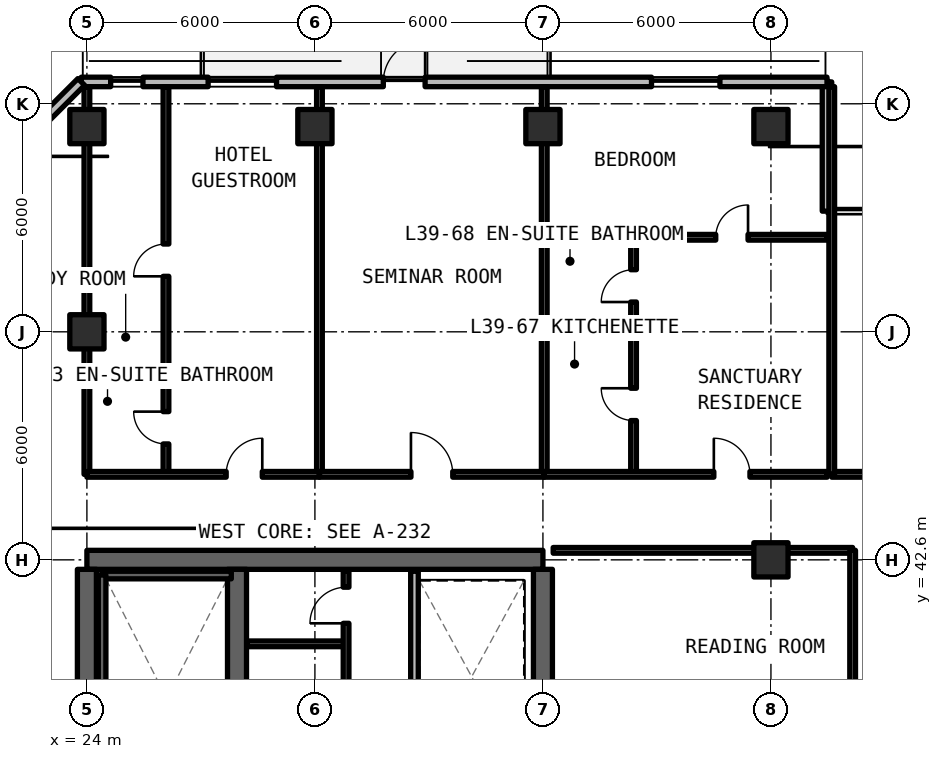
"""IFC4 building model, lengths in metres.
Left out: names, types, materials, properties, quantities, classifications, styles, units other than length and angle.
Written with IfcOpenShell. Run it as: python <this file> out.ifc"""

import sys

from ifc_helpers import new_model, si_unit, direction, frame, frame_2d, origin, origin_2d, place, context, subcontext, project, spatial, rectangle, extrude, element, fill, save


model = new_model("IFC4")
c1 = context("Model", 3, precision=1e-05, world=origin(), true_north=direction((0.0, 1.0)))
c2 = subcontext(c1, "Body", "Model", "MODEL_VIEW")
j1 = project(units=[si_unit("LENGTHUNIT", "METRE"), si_unit("PLANEANGLEUNIT", "RADIAN")], contexts=[c1])
p1 = place(None, origin())
s1 = spatial("IfcSite", under=j1, at=p1, CompositionType="ELEMENT")
p2 = place(p1, origin())
s2 = spatial("IfcBuilding", under=s1, at=p2, CompositionType="ELEMENT")
p3 = place(p2, frame((0.0, 0.0, 141.9)))
s3 = spatial("IfcBuildingStorey", under=s2, at=p3, CompositionType="ELEMENT", Elevation=141.9)
p4 = place(p3, frame((36.0, 42.6, 0.0), z_axis=(0.0, 0.0, 1.0), x_axis=(-1.0, 0.0, 0.0)))
e1 = element("IfcWall", 1, at=p4, inside=s3, PredefinedType="SHEAR", context=c2, shape_type="SweptSolid", body=[
    extrude(rectangle(XDim=12.0, YDim=0.5, at=frame_2d((6.0, 0.0))), origin(), (0.0, 0.0, 1.0), 3.3),
])
p5 = place(p3, frame((24.0, 24.85, 0.0), z_axis=(0.0, 0.0, 1.0), x_axis=(0.0, 1.0, 0.0)))
e2 = element("IfcWall", 2, at=p5, inside=s3, PredefinedType="SHEAR", context=c2, shape_type="SweptSolid", body=[
    extrude(rectangle(XDim=17.5, YDim=0.5, at=frame_2d((8.75, 0.0))), origin(), (0.0, 0.0, 1.0), 3.3),
])
p6 = place(p3, frame((36.0, 36.8, 0.0), z_axis=(0.0, 0.0, 1.0), x_axis=(0.0, 1.0, 0.0)))
e3 = element("IfcWall", 3, at=p6, inside=s3, PredefinedType="SHEAR", context=c2, shape_type="SweptSolid", body=[
    extrude(rectangle(XDim=5.55, YDim=0.5, at=frame_2d((2.775, 0.0))), origin(), (0.0, 0.0, 1.0), 3.3),
])
p7 = place(p3, frame((27.95, 24.85, 0.0), z_axis=(0.0, 0.0, 1.0), x_axis=(0.0, 1.0, 0.0)))
e4 = element("IfcWall", 4, at=p7, inside=s3, PredefinedType="SHEAR", context=c2, shape_type="SweptSolid", body=[
    extrude(rectangle(XDim=17.5, YDim=0.5, at=frame_2d((8.75, 0.0))), origin(), (0.0, 0.0, 1.0), 3.3),
])
p8 = place(p7, frame((0.4, 0.0, 0.0)))
e5 = element("IfcOpeningElement", 5, at=p8, cuts=e4, PredefinedType="OPENING", context=c2, shape_type="SweptSolid", body=[
    extrude(rectangle(XDim=1.15, YDim=2.15, at=frame_2d((0.575, 1.075))), frame((0.0, 0.26, 0.0), z_axis=(0.0, -1.0, 0.0), x_axis=(1.0, 0.0, 0.0)), (0.0, 0.0, 1.0), 0.52),
])
p9 = place(p7, frame((9.6, 0.0, 0.0)))
e6 = element("IfcOpeningElement", 6, at=p9, cuts=e4, PredefinedType="OPENING", context=c2, shape_type="SweptSolid", body=[
    extrude(rectangle(XDim=1.15, YDim=2.15, at=frame_2d((0.575, 1.075))), frame((0.0, 0.26, 0.0), z_axis=(0.0, -1.0, 0.0), x_axis=(1.0, 0.0, 0.0)), (0.0, 0.0, 1.0), 0.52),
])
for number, where, z_axis, x_axis in (
    (7, (42.0, 42.6, 0.0), (0.0, 0.0, 1.0), (1.0, 0.0, 0.0)),
    (8, (24.0, 48.6, 0.0), (0.0, 0.0, 1.0), (1.0, 0.0, 0.0)),
    (9, (24.0, 54.0, 0.0), (0.0, 0.0, 1.0), (1.0, 0.0, 0.0)),
    (10, (30.0, 54.0, 0.0), (0.0, 0.0, 1.0), (1.0, 0.0, 0.0)),
    (11, (36.0, 54.0, 0.0), (0.0, 0.0, 1.0), (1.0, 0.0, 0.0)),
    (12, (42.0, 54.0, 0.0), (0.0, 0.0, 1.0), (1.0, 0.0, 0.0)),
):
    element("IfcColumn", number, at=place(p3, frame(where, z_axis=z_axis, x_axis=x_axis)), inside=s3, PredefinedType="COLUMN", context=c2, shape_type="SweptSolid", body=[
        extrude(rectangle(XDim=0.9, YDim=0.9, at=origin_2d()), origin(), (0.0, 0.0, 1.0), 3.3),
    ])
p10 = place(p3, frame((43.475, 51.775, 0.0), z_axis=(0.0, 0.0, 1.0), x_axis=(0.0, 1.0, 0.0)))
e13 = element("IfcWall", 13, at=p10, inside=s3, PredefinedType="SOLIDWALL", context=c2, shape_type="SweptSolid", body=[
    extrude(rectangle(XDim=3.4, YDim=0.25, at=frame_2d((1.7, 0.0))), origin(), (0.0, 0.0, 1.0), 3.08),
])
p11 = place(p3, frame((43.475, 55.175, 0.0), z_axis=(0.0, 0.0, 1.0), x_axis=(-1.0, 0.0, 0.0)))
e14 = element("IfcWall", 14, at=p11, inside=s3, PredefinedType="SOLIDWALL", context=c2, shape_type="SweptSolid", body=[
    extrude(rectangle(XDim=19.623, YDim=0.25, at=frame_2d((9.812, 0.0))), origin(), (0.0, 0.0, 1.0), 3.08),
])
p12 = place(p11, frame((10.575, 0.0, 0.0)))
e15 = element("IfcOpeningElement", 15, at=p12, cuts=e14, PredefinedType="OPENING", context=c2, shape_type="SweptSolid", body=[
    extrude(rectangle(XDim=1.1, YDim=2.15, at=frame_2d((0.55, 1.075))), frame((0.0, 0.135, 0.0), z_axis=(0.0, -1.0, 0.0), x_axis=(1.0, 0.0, 0.0)), (0.0, 0.0, 1.0), 0.27),
])
p13 = place(p11, frame((18.0, 0.0, 0.78)))
e16 = element("IfcOpeningElement", 16, at=p13, cuts=e14, PredefinedType="OPENING", context=c2, shape_type="SweptSolid", body=[
    extrude(rectangle(XDim=0.85, YDim=1.65, at=frame_2d((0.425, 0.825))), frame((0.0, 0.135, 0.0), z_axis=(0.0, -1.0, 0.0), x_axis=(1.0, 0.0, 0.0)), (0.0, 0.0, 1.0), 0.27),
])
p14 = place(p11, frame((14.485, 0.0, 0.78)))
e17 = element("IfcOpeningElement", 17, at=p14, cuts=e14, PredefinedType="OPENING", context=c2, shape_type="SweptSolid", body=[
    extrude(rectangle(XDim=1.8, YDim=1.66, at=frame_2d((0.9, 0.83))), frame((0.0, 0.135, 0.0), z_axis=(0.0, -1.0, 0.0), x_axis=(1.0, 0.0, 0.0)), (0.0, 0.0, 1.0), 0.27),
])
p15 = place(p11, frame((2.818, 0.0, 0.78)))
e18 = element("IfcOpeningElement", 18, at=p15, cuts=e14, PredefinedType="OPENING", context=c2, shape_type="SweptSolid", body=[
    extrude(rectangle(XDim=1.8, YDim=1.66, at=frame_2d((0.9, 0.83))), frame((0.0, 0.135, 0.0), z_axis=(0.0, -1.0, 0.0), x_axis=(1.0, 0.0, 0.0)), (0.0, 0.0, 1.0), 0.27),
])
p16 = place(p3, frame((23.852, 55.175, 0.0), z_axis=(0.0, 0.0, 1.0), x_axis=(-0.70708586489, -0.707127696864, 0.0)))
e19 = element("IfcWall", 19, at=p16, inside=s3, PredefinedType="SOLIDWALL", context=c2, shape_type="SweptSolid", body=[
    extrude(rectangle(XDim=5.836, YDim=0.25, at=frame_2d((2.918, 0.0))), origin(), (0.0, 0.0, 1.0), 3.08),
])
p17 = place(p16, frame((1.538, 0.0, 0.78)))
e20 = element("IfcOpeningElement", 20, at=p17, cuts=e19, PredefinedType="OPENING", context=c2, shape_type="SweptSolid", body=[
    extrude(rectangle(XDim=3.4, YDim=1.66, at=frame_2d((1.7, 0.83))), frame((0.0, 0.135, 0.0), z_axis=(0.0, -1.0, 0.0), x_axis=(1.0, 0.0, 0.0)), (0.0, 0.0, 1.0), 0.27),
])
p18 = place(p3, frame((28.22, 40.39, 0.0), z_axis=(0.0, 0.0, 1.0), x_axis=(1.0, 0.0, 0.0)))
e21 = element("IfcWall", 21, at=p18, inside=s3, PredefinedType="SOLIDWALL", context=c2, shape_type="SweptSolid", body=[
    extrude(rectangle(XDim=2.58, YDim=0.15, at=frame_2d((1.29, 0.0))), origin(), (0.0, 0.0, 1.0), 2.35),
])
p19 = place(p3, frame((30.82, 36.88, 0.0), z_axis=(0.0, 0.0, 1.0), x_axis=(0.0, 1.0, 0.0)))
e22 = element("IfcWall", 22, at=p19, inside=s3, PredefinedType="SOLIDWALL", context=c2, shape_type="SweptSolid", body=[
    extrude(rectangle(XDim=5.42, YDim=0.15, at=frame_2d((2.71, 0.0))), origin(), (0.0, 0.0, 1.0), 2.35),
])
p20 = place(p19, frame((1.15, 0.0, 0.0)))
e23 = element("IfcOpeningElement", 23, at=p20, cuts=e22, PredefinedType="OPENING", context=c2, shape_type="SweptSolid", body=[
    extrude(rectangle(XDim=0.95, YDim=2.15, at=frame_2d((0.475, 1.075))), frame((0.0, 0.085, 0.0), z_axis=(0.0, -1.0, 0.0), x_axis=(1.0, 0.0, 0.0)), (0.0, 0.0, 1.0), 0.17),
])
p21 = place(p19, frame((4.05, 0.0, 0.0)))
e24 = element("IfcOpeningElement", 24, at=p21, cuts=e22, PredefinedType="OPENING", context=c2, shape_type="SweptSolid", body=[
    extrude(rectangle(XDim=0.95, YDim=2.15, at=frame_2d((0.475, 1.075))), frame((0.0, 0.085, 0.0), z_axis=(0.0, -1.0, 0.0), x_axis=(1.0, 0.0, 0.0)), (0.0, 0.0, 1.0), 0.17),
])
p22 = place(p3, frame((32.62, 36.88, 0.0), z_axis=(0.0, 0.0, 1.0), x_axis=(0.0, 1.0, 0.0)))
e25 = element("IfcWall", 25, at=p22, inside=s3, PredefinedType="SOLIDWALL", context=c2, shape_type="SweptSolid", body=[
    extrude(rectangle(XDim=5.42, YDim=0.2, at=frame_2d((2.71, 0.0))), origin(), (0.0, 0.0, 1.0), 2.35),
])
p23 = place(p3, frame((36.27, 42.85, 0.0), z_axis=(0.0, 0.0, 1.0), x_axis=(1.0, 0.0, 0.0)))
e26 = element("IfcWall", 26, at=p23, inside=s3, PredefinedType="SOLIDWALL", context=c2, shape_type="SweptSolid", body=[
    extrude(rectangle(XDim=7.88, YDim=0.15, at=frame_2d((3.94, 0.0))), origin(), (0.0, 0.0, 1.0), 2.35),
])
p24 = place(p3, frame((44.15, 36.85, 0.0), z_axis=(0.0, 0.0, 1.0), x_axis=(0.0, 1.0, 0.0)))
e27 = element("IfcWall", 27, at=p24, inside=s3, PredefinedType="SOLIDWALL", context=c2, shape_type="SweptSolid", body=[
    extrude(rectangle(XDim=6.0, YDim=0.15, at=frame_2d((3.0, 0.0))), origin(), (0.0, 0.0, 1.0), 2.35),
])
p25 = place(p3, frame((43.6, 44.85, 0.0), z_axis=(0.0, 0.0, 1.0), x_axis=(1.0, 0.0, 0.0)))
e28 = element("IfcWall", 28, at=p25, inside=s3, PredefinedType="SOLIDWALL", context=c2, shape_type="SweptSolid", body=[
    extrude(rectangle(XDim=8.4, YDim=0.15, at=frame_2d((4.2, 0.0))), origin(), (0.0, 0.0, 1.0), 2.35),
])
p26 = place(p25, frame((3.65, 0.0, 0.0)))
e29 = element("IfcOpeningElement", 29, at=p26, cuts=e28, PredefinedType="OPENING", context=c2, shape_type="SweptSolid", body=[
    extrude(rectangle(XDim=1.1, YDim=2.15, at=frame_2d((0.55, 1.075))), frame((0.0, 0.085, 0.0), z_axis=(0.0, -1.0, 0.0), x_axis=(1.0, 0.0, 0.0)), (0.0, 0.0, 1.0), 0.17),
])
for number, where, z_axis, x_axis in (
    (30, (43.6, 44.85, 0.0), (0.0, 0.0, 1.0), (0.0, 1.0, 0.0)),
    (31, (24.0, 44.85, 0.0), (0.0, 0.0, 1.0), (0.0, 1.0, 0.0)),
    (32, (30.119, 44.85, 0.0), (0.0, 0.0, 1.0), (0.0, 1.0, 0.0)),
):
    element("IfcWall", number, at=place(p3, frame(where, z_axis=z_axis, x_axis=x_axis)), inside=s3, PredefinedType="SOLIDWALL", context=c2, shape_type="SweptSolid", body=[
        extrude(rectangle(XDim=10.2, YDim=0.15, at=frame_2d((5.1, 0.0))), origin(), (0.0, 0.0, 1.0), 2.35),
    ])
p27 = place(p3, frame((24.0, 47.3, 0.0), z_axis=(0.0, 0.0, 1.0), x_axis=(1.0, 0.0, 0.0)))
e33 = element("IfcWall", 33, at=p27, inside=s3, PredefinedType="PARTITIONING", context=c2, shape_type="SweptSolid", body=[
    extrude(rectangle(XDim=2.081, YDim=0.15, at=frame_2d((1.04, 0.0))), origin(), (0.0, 0.0, 1.0), 2.35),
])
p28 = place(p3, frame((26.081, 44.85, 0.0), z_axis=(0.0, 0.0, 1.0), x_axis=(0.0, 1.0, 0.0)))
e34 = element("IfcWall", 34, at=p28, inside=s3, PredefinedType="PARTITIONING", context=c2, shape_type="SweptSolid", body=[
    extrude(rectangle(XDim=10.2, YDim=0.15, at=frame_2d((5.1, 0.0))), origin(), (0.0, 0.0, 1.0), 2.35),
])
p29 = place(p28, frame((0.8, 0.0, 0.0)))
e35 = element("IfcOpeningElement", 35, at=p29, cuts=e34, PredefinedType="OPENING", context=c2, shape_type="SweptSolid", body=[
    extrude(rectangle(XDim=0.85, YDim=2.1, at=frame_2d((0.425, 1.05))), frame((0.0, 0.085, 0.0), z_axis=(0.0, -1.0, 0.0), x_axis=(1.0, 0.0, 0.0)), (0.0, 0.0, 1.0), 0.17),
])
p30 = place(p28, frame((5.21, 0.0, 0.0)))
e36 = element("IfcOpeningElement", 36, at=p30, cuts=e34, PredefinedType="OPENING", context=c2, shape_type="SweptSolid", body=[
    extrude(rectangle(XDim=0.85, YDim=2.1, at=frame_2d((0.425, 1.05))), frame((0.0, 0.085, 0.0), z_axis=(0.0, -1.0, 0.0), x_axis=(1.0, 0.0, 0.0)), (0.0, 0.0, 1.0), 0.17),
])
p31 = place(p3, frame((24.0, 44.85, 0.0), z_axis=(0.0, 0.0, 1.0), x_axis=(1.0, 0.0, 0.0)))
e37 = element("IfcWall", 37, at=p31, inside=s3, PredefinedType="SOLIDWALL", context=c2, shape_type="SweptSolid", body=[
    extrude(rectangle(XDim=6.119, YDim=0.15, at=frame_2d((3.06, 0.0))), origin(), (0.0, 0.0, 1.0), 2.35),
])
p32 = place(p31, frame((3.665, 0.0, 0.0)))
e38 = element("IfcOpeningElement", 38, at=p32, cuts=e37, PredefinedType="OPENING", context=c2, shape_type="SweptSolid", body=[
    extrude(rectangle(XDim=0.95, YDim=2.15, at=frame_2d((0.475, 1.075))), frame((0.0, 0.085, 0.0), z_axis=(0.0, -1.0, 0.0), x_axis=(1.0, 0.0, 0.0)), (0.0, 0.0, 1.0), 0.17),
])
p33 = place(p3, frame((36.035, 44.85, 0.0), z_axis=(0.0, 0.0, 1.0), x_axis=(0.0, 1.0, 0.0)))
e39 = element("IfcWall", 39, at=p33, inside=s3, PredefinedType="SOLIDWALL", context=c2, shape_type="SweptSolid", body=[
    extrude(rectangle(XDim=10.2, YDim=0.15, at=frame_2d((5.1, 0.0))), origin(), (0.0, 0.0, 1.0), 2.35),
])
p34 = place(p3, frame((30.119, 44.85, 0.0), z_axis=(0.0, 0.0, 1.0), x_axis=(1.0, 0.0, 0.0)))
e40 = element("IfcWall", 40, at=p34, inside=s3, PredefinedType="SOLIDWALL", context=c2, shape_type="SweptSolid", body=[
    extrude(rectangle(XDim=5.916, YDim=0.15, at=frame_2d((2.958, 0.0))), origin(), (0.0, 0.0, 1.0), 2.35),
])
p35 = place(p34, frame((2.408, 0.0, 0.0)))
e41 = element("IfcOpeningElement", 41, at=p35, cuts=e40, PredefinedType="OPENING", context=c2, shape_type="SweptSolid", body=[
    extrude(rectangle(XDim=1.1, YDim=2.15, at=frame_2d((0.55, 1.075))), frame((0.0, 0.085, 0.0), z_axis=(0.0, -1.0, 0.0), x_axis=(1.0, 0.0, 0.0)), (0.0, 0.0, 1.0), 0.17),
])
p36 = place(p3, frame((36.035, 48.53, 0.0), z_axis=(0.0, 0.0, 1.0), x_axis=(1.0, 0.0, 0.0)))
e42 = element("IfcWall", 42, at=p36, inside=s3, PredefinedType="PARTITIONING", context=c2, shape_type="SweptSolid", body=[
    extrude(rectangle(XDim=2.35, YDim=0.15, at=frame_2d((1.175, 0.0))), origin(), (0.0, 0.0, 1.0), 2.35),
])
p37 = place(p3, frame((38.385, 44.85, 0.0), z_axis=(0.0, 0.0, 1.0), x_axis=(0.0, 1.0, 0.0)))
e43 = element("IfcWall", 43, at=p37, inside=s3, PredefinedType="PARTITIONING", context=c2, shape_type="SweptSolid", body=[
    extrude(rectangle(XDim=6.238, YDim=0.15, at=frame_2d((3.119, 0.0))), origin(), (0.0, 0.0, 1.0), 2.35),
])
p38 = place(p37, frame((1.415, 0.0, 0.0)))
e44 = element("IfcOpeningElement", 44, at=p38, cuts=e43, PredefinedType="OPENING", context=c2, shape_type="SweptSolid", body=[
    extrude(rectangle(XDim=0.85, YDim=2.1, at=frame_2d((0.425, 1.05))), frame((0.0, 0.085, 0.0), z_axis=(0.0, -1.0, 0.0), x_axis=(1.0, 0.0, 0.0)), (0.0, 0.0, 1.0), 0.17),
])
p39 = place(p37, frame((4.534, 0.0, 0.0)))
e45 = element("IfcOpeningElement", 45, at=p39, cuts=e43, PredefinedType="OPENING", context=c2, shape_type="SweptSolid", body=[
    extrude(rectangle(XDim=0.85, YDim=2.1, at=frame_2d((0.425, 1.05))), frame((0.0, 0.085, 0.0), z_axis=(0.0, -1.0, 0.0), x_axis=(1.0, 0.0, 0.0)), (0.0, 0.0, 1.0), 0.17),
])
p40 = place(p3, frame((36.035, 51.088, 0.0), z_axis=(0.0, 0.0, 1.0), x_axis=(1.0, 0.0, 0.0)))
e46 = element("IfcWall", 46, at=p40, inside=s3, PredefinedType="PARTITIONING", context=c2, shape_type="SweptSolid", body=[
    extrude(rectangle(XDim=7.445, YDim=0.15, at=frame_2d((3.723, 0.0))), origin(), (0.0, 0.0, 1.0), 2.35),
])
p41 = place(p40, frame((4.513, 0.0, 0.0)))
e47 = element("IfcOpeningElement", 47, at=p41, cuts=e46, PredefinedType="OPENING", context=c2, shape_type="SweptSolid", body=[
    extrude(rectangle(XDim=0.85, YDim=2.1, at=frame_2d((0.425, 1.05))), frame((0.0, 0.085, 0.0), z_axis=(0.0, -1.0, 0.0), x_axis=(1.0, 0.0, 0.0)), (0.0, 0.0, 1.0), 0.17),
])
p42 = place(p3, frame((36.035, 44.85, 0.0), z_axis=(0.0, 0.0, 1.0), x_axis=(1.0, 0.0, 0.0)))
e48 = element("IfcWall", 48, at=p42, inside=s3, PredefinedType="SOLIDWALL", context=c2, shape_type="SweptSolid", body=[
    extrude(rectangle(XDim=7.445, YDim=0.15, at=frame_2d((3.723, 0.0))), origin(), (0.0, 0.0, 1.0), 2.35),
])
p43 = place(p42, frame((4.463, 0.0, 0.0)))
e49 = element("IfcOpeningElement", 49, at=p43, cuts=e48, PredefinedType="OPENING", context=c2, shape_type="SweptSolid", body=[
    extrude(rectangle(XDim=0.95, YDim=2.15, at=frame_2d((0.475, 1.075))), frame((0.0, 0.085, 0.0), z_axis=(0.0, -1.0, 0.0), x_axis=(1.0, 0.0, 0.0)), (0.0, 0.0, 1.0), 0.17),
])
p44 = place(p3, frame((27.8, 42.2, 0.0), z_axis=(0.0, 0.0, 1.0), x_axis=(-1.0, 0.0, 0.0)))
e50 = element("IfcWall", 50, at=p44, inside=s3, PredefinedType="SOLIDWALL", context=c2, shape_type="SweptSolid", body=[
    extrude(rectangle(XDim=3.4, YDim=0.2, at=frame_2d((1.7, 0.0))), origin(), (0.0, 0.0, 1.0), 3.3),
])
p45 = place(p3, frame((24.4, 42.2, 0.0), z_axis=(0.0, 0.0, 1.0), x_axis=(0.0, -1.0, 0.0)))
e51 = element("IfcWall", 51, at=p45, inside=s3, PredefinedType="SOLIDWALL", context=c2, shape_type="SweptSolid", body=[
    extrude(rectangle(XDim=8.0, YDim=0.2, at=frame_2d((4.0, 0.0))), origin(), (0.0, 0.0, 1.0), 3.3),
])
p46 = place(p12, frame((1.1, 0.0, 0.0), z_axis=(0.0, 0.0, 1.0), x_axis=(-1.0, 0.0, 0.0)))
e52 = element("IfcDoor", 52, at=p46, inside=s3, OperationType="SINGLE_SWING_LEFT", PredefinedType="DOOR", context=c2, shape_type="SweptSolid", body=[
    extrude(rectangle(XDim=1.1, YDim=2.15, at=frame_2d((0.55, 1.075))), frame((0.0, 0.025, 0.0), z_axis=(0.0, -1.0, 0.0), x_axis=(1.0, 0.0, 0.0)), (0.0, 0.0, 1.0), 0.05),
])
fill(e15, e52)
p47 = place(p13, origin())
e53 = element("IfcWindow", 53, at=p47, inside=s3, PartitioningType="SINGLE_PANEL", PredefinedType="WINDOW", context=c2, shape_type="SweptSolid", body=[
    extrude(rectangle(XDim=0.85, YDim=1.65, at=frame_2d((0.425, 0.825))), frame((0.0, 0.03, 0.0), z_axis=(0.0, -1.0, 0.0), x_axis=(1.0, 0.0, 0.0)), (0.0, 0.0, 1.0), 0.06),
])
fill(e16, e53)
p48 = place(p14, origin())
e54 = element("IfcWindow", 54, at=p48, inside=s3, PartitioningType="SINGLE_PANEL", PredefinedType="WINDOW", context=c2, shape_type="SweptSolid", body=[
    extrude(rectangle(XDim=1.8, YDim=1.66, at=frame_2d((0.9, 0.83))), frame((0.0, 0.03, 0.0), z_axis=(0.0, -1.0, 0.0), x_axis=(1.0, 0.0, 0.0)), (0.0, 0.0, 1.0), 0.06),
])
fill(e17, e54)
p49 = place(p15, origin())
e55 = element("IfcWindow", 55, at=p49, inside=s3, PartitioningType="SINGLE_PANEL", PredefinedType="WINDOW", context=c2, shape_type="SweptSolid", body=[
    extrude(rectangle(XDim=1.8, YDim=1.66, at=frame_2d((0.9, 0.83))), frame((0.0, 0.03, 0.0), z_axis=(0.0, -1.0, 0.0), x_axis=(1.0, 0.0, 0.0)), (0.0, 0.0, 1.0), 0.06),
])
fill(e18, e55)
p50 = place(p21, origin())
e56 = element("IfcDoor", 56, at=p50, inside=s3, OperationType="SINGLE_SWING_LEFT", PredefinedType="DOOR", context=c2, shape_type="SweptSolid", body=[
    extrude(rectangle(XDim=0.95, YDim=2.15, at=frame_2d((0.475, 1.075))), frame((0.0, 0.025, 0.0), z_axis=(0.0, -1.0, 0.0), x_axis=(1.0, 0.0, 0.0)), (0.0, 0.0, 1.0), 0.05),
])
fill(e24, e56)
p51 = place(p29, origin())
e57 = element("IfcDoor", 57, at=p51, inside=s3, OperationType="SINGLE_SWING_RIGHT", PredefinedType="DOOR", context=c2, shape_type="SweptSolid", body=[
    extrude(rectangle(XDim=0.85, YDim=2.1, at=frame_2d((0.425, 1.05))), frame((0.0, 0.025, 0.0), z_axis=(0.0, -1.0, 0.0), x_axis=(1.0, 0.0, 0.0)), (0.0, 0.0, 1.0), 0.05),
])
fill(e35, e57)
p52 = place(p30, origin())
e58 = element("IfcDoor", 58, at=p52, inside=s3, OperationType="SINGLE_SWING_LEFT", PredefinedType="DOOR", context=c2, shape_type="SweptSolid", body=[
    extrude(rectangle(XDim=0.85, YDim=2.1, at=frame_2d((0.425, 1.05))), frame((0.0, 0.025, 0.0), z_axis=(0.0, -1.0, 0.0), x_axis=(1.0, 0.0, 0.0)), (0.0, 0.0, 1.0), 0.05),
])
fill(e36, e58)
p53 = place(p32, origin())
e59 = element("IfcDoor", 59, at=p53, inside=s3, OperationType="SINGLE_SWING_RIGHT", PredefinedType="DOOR", context=c2, shape_type="SweptSolid", body=[
    extrude(rectangle(XDim=0.95, YDim=2.15, at=frame_2d((0.475, 1.075))), frame((0.0, 0.025, 0.0), z_axis=(0.0, -1.0, 0.0), x_axis=(1.0, 0.0, 0.0)), (0.0, 0.0, 1.0), 0.05),
])
fill(e38, e59)
p54 = place(p35, origin())
e60 = element("IfcDoor", 60, at=p54, inside=s3, OperationType="SINGLE_SWING_LEFT", PredefinedType="DOOR", context=c2, shape_type="SweptSolid", body=[
    extrude(rectangle(XDim=1.1, YDim=2.15, at=frame_2d((0.55, 1.075))), frame((0.0, 0.025, 0.0), z_axis=(0.0, -1.0, 0.0), x_axis=(1.0, 0.0, 0.0)), (0.0, 0.0, 1.0), 0.05),
])
fill(e41, e60)
p55 = place(p38, origin())
e61 = element("IfcDoor", 61, at=p55, inside=s3, OperationType="SINGLE_SWING_RIGHT", PredefinedType="DOOR", context=c2, shape_type="SweptSolid", body=[
    extrude(rectangle(XDim=0.85, YDim=2.1, at=frame_2d((0.425, 1.05))), frame((0.0, 0.025, 0.0), z_axis=(0.0, -1.0, 0.0), x_axis=(1.0, 0.0, 0.0)), (0.0, 0.0, 1.0), 0.05),
])
fill(e44, e61)
p56 = place(p39, origin())
e62 = element("IfcDoor", 62, at=p56, inside=s3, OperationType="SINGLE_SWING_LEFT", PredefinedType="DOOR", context=c2, shape_type="SweptSolid", body=[
    extrude(rectangle(XDim=0.85, YDim=2.1, at=frame_2d((0.425, 1.05))), frame((0.0, 0.025, 0.0), z_axis=(0.0, -1.0, 0.0), x_axis=(1.0, 0.0, 0.0)), (0.0, 0.0, 1.0), 0.05),
])
fill(e45, e62)
p57 = place(p41, origin())
e63 = element("IfcDoor", 63, at=p57, inside=s3, OperationType="SINGLE_SWING_RIGHT", PredefinedType="DOOR", context=c2, shape_type="SweptSolid", body=[
    extrude(rectangle(XDim=0.85, YDim=2.1, at=frame_2d((0.425, 1.05))), frame((0.0, 0.025, 0.0), z_axis=(0.0, -1.0, 0.0), x_axis=(1.0, 0.0, 0.0)), (0.0, 0.0, 1.0), 0.05),
])
fill(e47, e63)
p58 = place(p43, origin())
e64 = element("IfcDoor", 64, at=p58, inside=s3, OperationType="SINGLE_SWING_LEFT", PredefinedType="DOOR", context=c2, shape_type="SweptSolid", body=[
    extrude(rectangle(XDim=0.95, YDim=2.15, at=frame_2d((0.475, 1.075))), frame((0.0, 0.025, 0.0), z_axis=(0.0, -1.0, 0.0), x_axis=(1.0, 0.0, 0.0)), (0.0, 0.0, 1.0), 0.05),
])
fill(e49, e64)
save(model, sys.argv[1])
